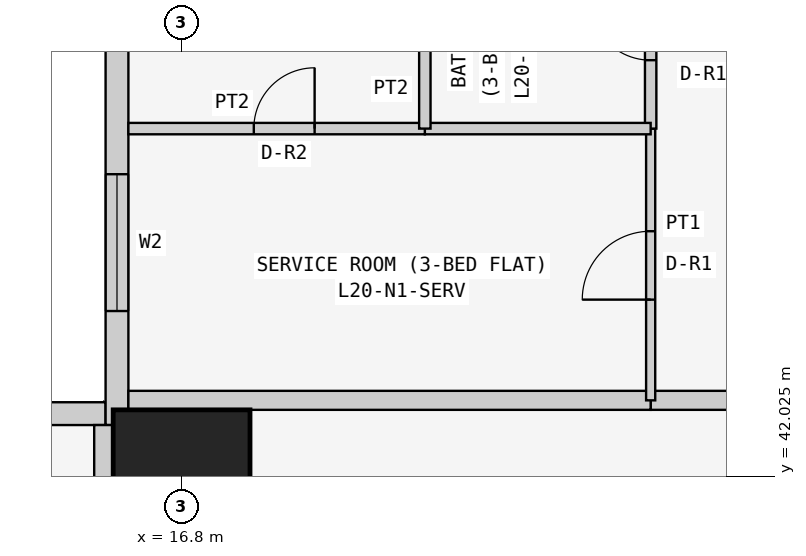
"""IFC4 building model, lengths in metres.
Left out: names, types, materials, properties, quantities, classifications, styles, units other than length and angle.
Written with IfcOpenShell. Run it as: python <this file> out.ifc"""

import sys

from ifc_helpers import new_model, si_unit, direction, frame, frame_2d, origin, origin_2d, place, context, subcontext, project, spatial, rectangle, extrude, element, fill, save


model = new_model("IFC4")
c1 = context("Model", 3, precision=1e-05, world=origin(), true_north=direction((0.0, 1.0)))
c2 = subcontext(c1, "Body", "Model", "MODEL_VIEW")
j1 = project(units=[si_unit("LENGTHUNIT", "METRE"), si_unit("PLANEANGLEUNIT", "RADIAN")], contexts=[c1])
p1 = place(None, origin())
s1 = spatial("IfcSite", under=j1, at=p1, CompositionType="ELEMENT")
p2 = place(p1, origin())
s2 = spatial("IfcBuilding", under=s1, at=p2, CompositionType="ELEMENT")
p3 = place(p2, frame((0.0, 0.0, 81.3)))
s3 = spatial("IfcBuildingStorey", under=s2, at=p3, CompositionType="ELEMENT", Elevation=81.3)
p4 = place(p3, frame((16.8, 42.0, 0.0), z_axis=(0.0, 0.0, 1.0), x_axis=(1.0, 0.0, 0.0)))
e1 = element("IfcColumn", 1, at=p4, inside=s3, PredefinedType="COLUMN", context=c2, shape_type="SweptSolid", body=[
    extrude(rectangle(XDim=1.8, YDim=1.8, at=origin_2d()), origin(), (0.0, 0.0, 1.0), 3.6),
])
p5 = place(p3, frame((15.8, 42.85, 0.0), z_axis=(0.0, 0.0, 1.0), x_axis=(-1.0, 0.0, 0.0)))
e2 = element("IfcWall", 2, at=p5, inside=s3, PredefinedType="SOLIDWALL", context=c2, shape_type="SweptSolid", body=[
    extrude(rectangle(XDim=15.4, YDim=0.3, at=frame_2d((7.7, 0.0))), origin(), (0.0, 0.0, 1.0), 3.45),
])
p6 = place(p5, frame((1.2, 0.0, 0.9)))
e3 = element("IfcOpeningElement", 3, at=p6, cuts=e2, PredefinedType="OPENING", context=c2, shape_type="SweptSolid", body=[
    extrude(rectangle(XDim=1.8, YDim=1.5, at=frame_2d((0.9, 0.75))), frame((0.0, 0.16, 0.0), z_axis=(0.0, -1.0, 0.0), x_axis=(1.0, 0.0, 0.0)), (0.0, 0.0, 1.0), 0.32),
])
p7 = place(p5, frame((4.95, 0.0, 1.5)))
e4 = element("IfcOpeningElement", 4, at=p7, cuts=e2, PredefinedType="OPENING", context=c2, shape_type="SweptSolid", body=[
    extrude(rectangle(XDim=0.9, YDim=0.7, at=frame_2d((0.45, 0.35))), frame((0.0, 0.16, 0.0), z_axis=(0.0, -1.0, 0.0), x_axis=(1.0, 0.0, 0.0)), (0.0, 0.0, 1.0), 0.32),
])
p8 = place(p5, frame((8.5, 0.0, 0.9)))
e5 = element("IfcOpeningElement", 5, at=p8, cuts=e2, PredefinedType="OPENING", context=c2, shape_type="SweptSolid", body=[
    extrude(rectangle(XDim=1.8, YDim=1.5, at=frame_2d((0.9, 0.75))), frame((0.0, 0.16, 0.0), z_axis=(0.0, -1.0, 0.0), x_axis=(1.0, 0.0, 0.0)), (0.0, 0.0, 1.0), 0.32),
])
p9 = place(p5, frame((12.5, 0.0, 0.0)))
e6 = element("IfcOpeningElement", 6, at=p9, cuts=e2, PredefinedType="OPENING", context=c2, shape_type="SweptSolid", body=[
    extrude(rectangle(XDim=0.9, YDim=2.4, at=frame_2d((0.45, 1.2))), frame((0.0, 0.16, 0.0), z_axis=(0.0, -1.0, 0.0), x_axis=(1.0, 0.0, 0.0)), (0.0, 0.0, 1.0), 0.32),
])
p10 = place(p5, frame((13.5, 0.0, 0.9)))
e7 = element("IfcOpeningElement", 7, at=p10, cuts=e2, PredefinedType="OPENING", context=c2, shape_type="SweptSolid", body=[
    extrude(rectangle(XDim=1.2, YDim=1.5, at=frame_2d((0.6, 0.75))), frame((0.0, 0.16, 0.0), z_axis=(0.0, -1.0, 0.0), x_axis=(1.0, 0.0, 0.0)), (0.0, 0.0, 1.0), 0.32),
])
p11 = place(p3, frame((15.95, 58.4, 0.0), z_axis=(0.0, 0.0, 1.0), x_axis=(0.0, -1.0, 0.0)))
e8 = element("IfcWall", 8, at=p11, inside=s3, PredefinedType="SOLIDWALL", context=c2, shape_type="SweptSolid", body=[
    extrude(rectangle(XDim=15.7, YDim=0.3, at=frame_2d((7.85, 0.0))), origin(), (0.0, 0.0, 1.0), 3.45),
])
p12 = place(p11, frame((12.4, 0.0, 0.9)))
e9 = element("IfcOpeningElement", 9, at=p12, cuts=e8, PredefinedType="OPENING", context=c2, shape_type="SweptSolid", body=[
    extrude(rectangle(XDim=1.8, YDim=1.5, at=frame_2d((0.9, 0.75))), frame((0.0, 0.16, 0.0), z_axis=(0.0, -1.0, 0.0), x_axis=(1.0, 0.0, 0.0)), (0.0, 0.0, 1.0), 0.32),
])
p13 = place(p11, frame((9.55, 0.0, 1.5)))
e10 = element("IfcOpeningElement", 10, at=p13, cuts=e8, PredefinedType="OPENING", context=c2, shape_type="SweptSolid", body=[
    extrude(rectangle(XDim=0.9, YDim=0.7, at=frame_2d((0.45, 0.35))), frame((0.0, 0.16, 0.0), z_axis=(0.0, -1.0, 0.0), x_axis=(1.0, 0.0, 0.0)), (0.0, 0.0, 1.0), 0.32),
])
p14 = place(p11, frame((5.1, 0.0, 0.9)))
e11 = element("IfcOpeningElement", 11, at=p14, cuts=e8, PredefinedType="OPENING", context=c2, shape_type="SweptSolid", body=[
    extrude(rectangle(XDim=1.8, YDim=1.5, at=frame_2d((0.9, 0.75))), frame((0.0, 0.16, 0.0), z_axis=(0.0, -1.0, 0.0), x_axis=(1.0, 0.0, 0.0)), (0.0, 0.0, 1.0), 0.32),
])
p15 = place(p11, frame((2.0, 0.0, 0.0)))
e12 = element("IfcOpeningElement", 12, at=p15, cuts=e8, PredefinedType="OPENING", context=c2, shape_type="SweptSolid", body=[
    extrude(rectangle(XDim=0.9, YDim=2.4, at=frame_2d((0.45, 1.2))), frame((0.0, 0.16, 0.0), z_axis=(0.0, -1.0, 0.0), x_axis=(1.0, 0.0, 0.0)), (0.0, 0.0, 1.0), 0.32),
])
p16 = place(p11, frame((0.7, 0.0, 0.9)))
e13 = element("IfcOpeningElement", 13, at=p16, cuts=e8, PredefinedType="OPENING", context=c2, shape_type="SweptSolid", body=[
    extrude(rectangle(XDim=1.2, YDim=1.5, at=frame_2d((0.6, 0.75))), frame((0.0, 0.16, 0.0), z_axis=(0.0, -1.0, 0.0), x_axis=(1.0, 0.0, 0.0)), (0.0, 0.0, 1.0), 0.32),
])
p17 = place(p3, frame((22.971, 43.025, 0.0), z_axis=(0.0, 0.0, 1.0), x_axis=(1.0, 0.0, 0.0)))
e14 = element("IfcWall", 14, at=p17, inside=s3, PredefinedType="PARTITIONING", context=c2, shape_type="SweptSolid", body=[
    extrude(rectangle(XDim=1.2, YDim=0.25, at=frame_2d((0.6, 0.0))), origin(), (0.0, 0.0, 1.0), 3.45),
])
p18 = place(p3, frame((16.1, 43.025, 0.0), z_axis=(0.0, 0.0, 1.0), x_axis=(1.0, 0.0, 0.0)))
e15 = element("IfcWall", 15, at=p18, inside=s3, PredefinedType="PARTITIONING", context=c2, shape_type="SweptSolid", body=[
    extrude(rectangle(XDim=6.871, YDim=0.25, at=frame_2d((3.436, 0.0))), origin(), (0.0, 0.0, 1.0), 3.45),
])
p19 = place(p3, frame((15.775, 36.229, 0.0), z_axis=(0.0, 0.0, 1.0), x_axis=(0.0, 1.0, 0.0)))
e16 = element("IfcWall", 16, at=p19, inside=s3, PredefinedType="PARTITIONING", context=c2, shape_type="SweptSolid", body=[
    extrude(rectangle(XDim=6.471, YDim=0.25, at=frame_2d((3.235, 0.0))), origin(), (0.0, 0.0, 1.0), 3.45),
])
p20 = place(p3, frame((22.971, 46.6, 0.0), z_axis=(0.0, 0.0, 1.0), x_axis=(0.0, -1.0, 0.0)))
e17 = element("IfcWall", 17, at=p20, inside=s3, PredefinedType="PARTITIONING", context=c2, shape_type="SweptSolid", body=[
    extrude(rectangle(XDim=3.575, YDim=0.12, at=frame_2d((1.788, 0.0))), origin(), (0.0, 0.0, 1.0), 3.45),
])
p21 = place(p20, frame((1.35, 0.0, 0.0)))
e18 = element("IfcOpeningElement", 18, at=p21, cuts=e17, PredefinedType="OPENING", context=c2, shape_type="SweptSolid", body=[
    extrude(rectangle(XDim=0.9, YDim=2.1, at=frame_2d((0.45, 1.05))), frame((0.0, 0.07, 0.0), z_axis=(0.0, -1.0, 0.0), x_axis=(1.0, 0.0, 0.0)), (0.0, 0.0, 1.0), 0.14),
])
p22 = place(p3, frame((22.971, 49.2, 0.0), z_axis=(0.0, 0.0, 1.0), x_axis=(0.0, -1.0, 0.0)))
e19 = element("IfcWall", 19, at=p22, inside=s3, PredefinedType="PARTITIONING", context=c2, shape_type="SweptSolid", body=[
    extrude(rectangle(XDim=2.6, YDim=0.15, at=frame_2d((1.3, 0.0))), origin(), (0.0, 0.0, 1.0), 3.45),
])
p23 = place(p22, frame((0.9, 0.0, 0.0)))
e20 = element("IfcOpeningElement", 20, at=p23, cuts=e19, PredefinedType="OPENING", context=c2, shape_type="SweptSolid", body=[
    extrude(rectangle(XDim=0.8, YDim=2.1, at=frame_2d((0.4, 1.05))), frame((0.0, 0.085, 0.0), z_axis=(0.0, -1.0, 0.0), x_axis=(1.0, 0.0, 0.0)), (0.0, 0.0, 1.0), 0.17),
])
p24 = place(p3, frame((22.971, 46.6, 0.0), z_axis=(0.0, 0.0, 1.0), x_axis=(-1.0, 0.0, 0.0)))
e21 = element("IfcWall", 21, at=p24, inside=s3, PredefinedType="PARTITIONING", context=c2, shape_type="SweptSolid", body=[
    extrude(rectangle(XDim=2.971, YDim=0.15, at=frame_2d((1.485, 0.0))), origin(), (0.0, 0.0, 1.0), 3.45),
])
p25 = place(p3, frame((20.0, 46.6, 0.0), z_axis=(0.0, 0.0, 1.0), x_axis=(-1.0, 0.0, 0.0)))
e22 = element("IfcWall", 22, at=p25, inside=s3, PredefinedType="PARTITIONING", context=c2, shape_type="SweptSolid", body=[
    extrude(rectangle(XDim=3.9, YDim=0.15, at=frame_2d((1.95, 0.0))), origin(), (0.0, 0.0, 1.0), 3.45),
])
p26 = place(p25, frame((1.45, 0.0, 0.0)))
e23 = element("IfcOpeningElement", 23, at=p26, cuts=e22, PredefinedType="OPENING", context=c2, shape_type="SweptSolid", body=[
    extrude(rectangle(XDim=0.8, YDim=2.1, at=frame_2d((0.4, 1.05))), frame((0.0, 0.085, 0.0), z_axis=(0.0, -1.0, 0.0), x_axis=(1.0, 0.0, 0.0)), (0.0, 0.0, 1.0), 0.17),
])
p27 = place(p3, frame((20.0, 49.2, 0.0), z_axis=(0.0, 0.0, 1.0), x_axis=(0.0, -1.0, 0.0)))
e24 = element("IfcWall", 24, at=p27, inside=s3, PredefinedType="PARTITIONING", context=c2, shape_type="SweptSolid", body=[
    extrude(rectangle(XDim=2.6, YDim=0.15, at=frame_2d((1.3, 0.0))), origin(), (0.0, 0.0, 1.0), 3.45),
])
p28 = place(p12, origin())
e25 = element("IfcWindow", 25, at=p28, inside=s3, PartitioningType="SINGLE_PANEL", PredefinedType="WINDOW", context=c2, shape_type="SweptSolid", body=[
    extrude(rectangle(XDim=1.8, YDim=1.5, at=frame_2d((0.9, 0.75))), frame((0.0, 0.03, 0.0), z_axis=(0.0, -1.0, 0.0), x_axis=(1.0, 0.0, 0.0)), (0.0, 0.0, 1.0), 0.06),
])
fill(e9, e25)
p29 = place(p21, frame((0.9, 0.0, 0.0), z_axis=(0.0, 0.0, 1.0), x_axis=(-1.0, 0.0, 0.0)))
e26 = element("IfcDoor", 26, at=p29, inside=s3, OperationType="SINGLE_SWING_LEFT", PredefinedType="DOOR", context=c2, shape_type="SweptSolid", body=[
    extrude(rectangle(XDim=0.9, YDim=2.1, at=frame_2d((0.45, 1.05))), frame((0.0, 0.025, 0.0), z_axis=(0.0, -1.0, 0.0), x_axis=(1.0, 0.0, 0.0)), (0.0, 0.0, 1.0), 0.05),
])
fill(e18, e26)
p30 = place(p26, frame((0.8, 0.0, 0.0), z_axis=(0.0, 0.0, 1.0), x_axis=(-1.0, 0.0, 0.0)))
e27 = element("IfcDoor", 27, at=p30, inside=s3, OperationType="SINGLE_SWING_RIGHT", PredefinedType="DOOR", context=c2, shape_type="SweptSolid", body=[
    extrude(rectangle(XDim=0.8, YDim=2.1, at=frame_2d((0.4, 1.05))), frame((0.0, 0.025, 0.0), z_axis=(0.0, -1.0, 0.0), x_axis=(1.0, 0.0, 0.0)), (0.0, 0.0, 1.0), 0.05),
])
fill(e23, e27)
p31 = place(p23, frame((0.8, 0.0, 0.0), z_axis=(0.0, 0.0, 1.0), x_axis=(-1.0, 0.0, 0.0)))
e28 = element("IfcDoor", 28, at=p31, inside=s3, OperationType="SINGLE_SWING_RIGHT", PredefinedType="DOOR", context=c2, shape_type="SweptSolid", body=[
    extrude(rectangle(XDim=0.8, YDim=2.1, at=frame_2d((0.4, 1.05))), frame((0.0, 0.025, 0.0), z_axis=(0.0, -1.0, 0.0), x_axis=(1.0, 0.0, 0.0)), (0.0, 0.0, 1.0), 0.05),
])
fill(e20, e28)
save(model, sys.argv[1])
